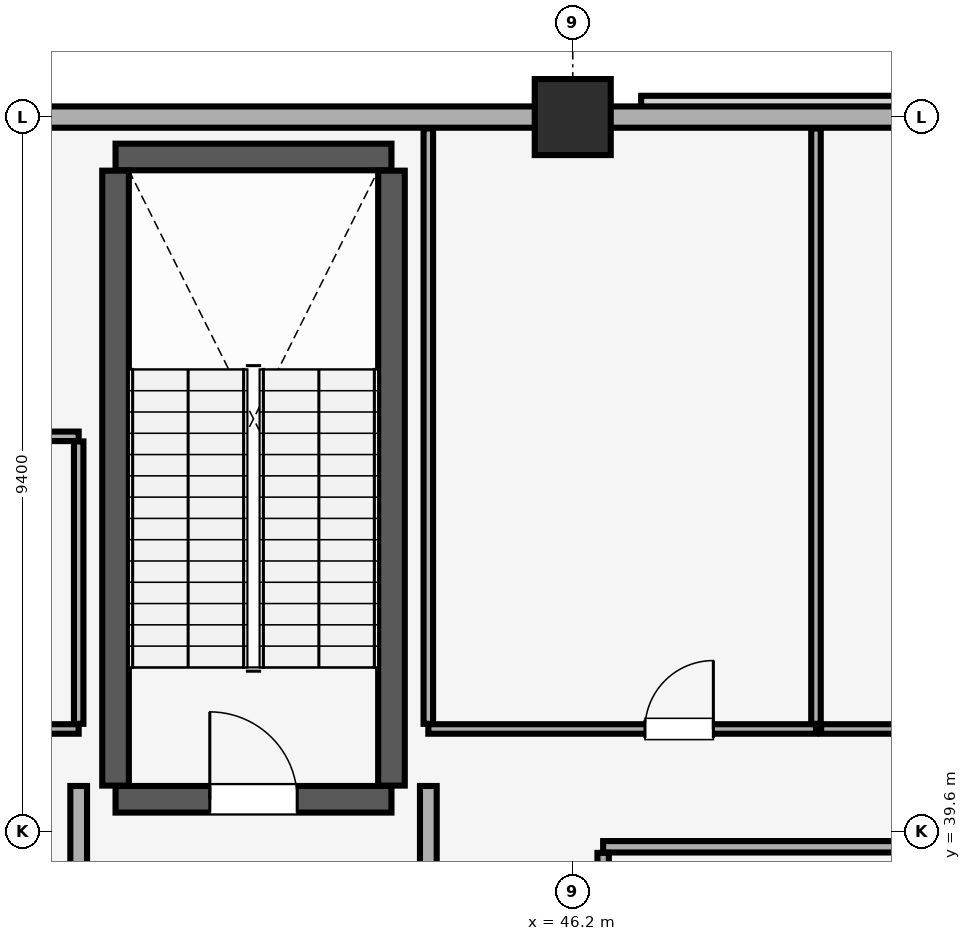
"""IFC4 building model, lengths in metres.
Left out: names, types, materials, properties, quantities, classifications, styles, units other than length and angle.
Written with IfcOpenShell. Run it as: python <this file> out.ifc"""

import sys

from ifc_helpers import new_model, si_unit, direction, frame, frame_2d, origin, origin_2d, place, context, subcontext, project, spatial, rectangle, extrude, element, fill, save


model = new_model("IFC4")
c1 = context("Model", 3, precision=1e-05, world=origin(), true_north=direction((0.0, 1.0)))
c2 = subcontext(c1, "Body", "Model", "MODEL_VIEW")
j1 = project(units=[si_unit("LENGTHUNIT", "METRE"), si_unit("PLANEANGLEUNIT", "RADIAN")], contexts=[c1])
p1 = place(None, origin())
s1 = spatial("IfcSite", under=j1, at=p1, CompositionType="ELEMENT")
p2 = place(p1, origin())
s2 = spatial("IfcBuilding", under=s1, at=p2, CompositionType="ELEMENT")
p3 = place(p2, frame((0.0, 0.0, 280.5)))
s3 = spatial("IfcBuildingStorey", under=s2, at=p3, CompositionType="ELEMENT", Elevation=280.5)
p4 = place(p3, frame((46.2, 49.0, 0.0), z_axis=(0.0, 0.0, 1.0), x_axis=(1.0, 0.0, 0.0)))
e1 = element("IfcColumn", 1, at=p4, inside=s3, PredefinedType="COLUMN", context=c2, shape_type="SweptSolid", body=[
    extrude(rectangle(XDim=1.0, YDim=1.0, at=origin_2d()), origin(), (0.0, 0.0, 1.0), 5.1),
])
p5 = place(p3, frame((74.2, 49.0, 0.0), z_axis=(0.0, 0.0, 1.0), x_axis=(-1.0, 0.0, 0.0)))
e2 = element("IfcWall", 2, at=p5, inside=s3, PredefinedType="SOLIDWALL", context=c2, shape_type="SweptSolid", body=[
    extrude(rectangle(XDim=64.4, YDim=0.28, at=frame_2d((32.2, 0.0))), origin(), (0.0, 0.0, 1.0), 4.0),
])
p6 = place(p3, frame((40.185, 40.025, 0.0), z_axis=(0.0, 0.0, 1.0), x_axis=(1.0, 0.0, 0.0)))
e3 = element("IfcWall", 3, at=p6, inside=s3, PredefinedType="SHEAR", context=c2, shape_type="SweptSolid", body=[
    extrude(rectangle(XDim=3.63, YDim=0.35, at=frame_2d((1.815, 0.0))), origin(), (0.0, 0.0, 1.0), 5.1),
])
p7 = place(p6, frame((1.24, 0.0, 0.0)))
e4 = element("IfcOpeningElement", 4, at=p7, cuts=e3, PredefinedType="OPENING", context=c2, shape_type="SweptSolid", body=[
    extrude(rectangle(XDim=1.15, YDim=2.15, at=frame_2d((0.575, 1.075))), frame((0.0, 0.185, 0.0), z_axis=(0.0, -1.0, 0.0), x_axis=(1.0, 0.0, 0.0)), (0.0, 0.0, 1.0), 0.37),
])
p8 = place(p3, frame((40.185, 48.475, 0.0), z_axis=(0.0, 0.0, 1.0), x_axis=(1.0, 0.0, 0.0)))
e5 = element("IfcWall", 5, at=p8, inside=s3, PredefinedType="SHEAR", context=c2, shape_type="SweptSolid", body=[
    extrude(rectangle(XDim=3.63, YDim=0.35, at=frame_2d((1.815, 0.0))), origin(), (0.0, 0.0, 1.0), 5.1),
])
for number, where, z_axis, x_axis in (
    (6, (40.185, 40.205, 0.0), (0.0, 0.0, 1.0), (0.0, 1.0, 0.0)),
    (7, (43.815, 40.205, 0.0), (0.0, 0.0, 1.0), (0.0, 1.0, 0.0)),
):
    element("IfcWall", number, at=place(p3, frame(where, z_axis=z_axis, x_axis=x_axis)), inside=s3, PredefinedType="SHEAR", context=c2, shape_type="SweptSolid", body=[
        extrude(rectangle(XDim=8.09, YDim=0.35, at=frame_2d((4.045, 0.0))), origin(), (0.0, 0.0, 1.0), 5.1),
    ])
for number, where, z_axis, x_axis in (
    (8, (39.7, 34.415, 0.0), (0.0, 0.0, 1.0), (0.0, 1.0, 0.0)),
    (9, (44.3, 34.415, 0.0), (0.0, 0.0, 1.0), (0.0, 1.0, 0.0)),
):
    element("IfcWall", number, at=place(p3, frame(where, z_axis=z_axis, x_axis=x_axis)), inside=s3, PredefinedType="PARTITIONING", context=c2, shape_type="SweptSolid", body=[
        extrude(rectangle(XDim=5.785, YDim=0.22, at=frame_2d((2.893, 0.0))), origin(), (0.0, 0.0, 1.0), 5.1),
    ])
p9 = place(p3, frame((46.6, 39.4, 0.0), z_axis=(0.0, 0.0, 1.0), x_axis=(1.0, 0.0, 0.0)))
e10 = element("IfcWall", 10, at=p9, inside=s3, PredefinedType="PARTITIONING", context=c2, shape_type="SweptSolid", body=[
    extrude(rectangle(XDim=7.95, YDim=0.15, at=frame_2d((3.975, 0.0))), origin(), (0.0, 0.0, 1.0), 5.1),
])
p10 = place(p3, frame((46.6, 34.38, 0.0), z_axis=(0.0, 0.0, 1.0), x_axis=(0.0, 1.0, 0.0)))
e11 = element("IfcWall", 11, at=p10, inside=s3, PredefinedType="PARTITIONING", context=c2, shape_type="SweptSolid", body=[
    extrude(rectangle(XDim=4.94, YDim=0.15, at=frame_2d((2.47, 0.0))), origin(), (0.0, 0.0, 1.0), 5.1),
])
p11 = place(p3, frame((36.11, 40.95, 0.0), z_axis=(0.0, 0.0, 1.0), x_axis=(1.0, 0.0, 0.0)))
e12 = element("IfcWall", 12, at=p11, inside=s3, PredefinedType="PARTITIONING", context=c2, shape_type="SweptSolid", body=[
    extrude(rectangle(XDim=3.59, YDim=0.125, at=frame_2d((1.795, 0.0))), origin(), (0.0, 0.0, 1.0), 5.1),
])
p12 = place(p11, frame((1.34, 0.0, 0.0)))
e13 = element("IfcOpeningElement", 13, at=p12, cuts=e12, PredefinedType="OPENING", context=c2, shape_type="SweptSolid", body=[
    extrude(rectangle(XDim=0.9, YDim=2.1, at=frame_2d((0.45, 1.05))), frame((0.0, 0.073, 0.0), z_axis=(0.0, -1.0, 0.0), x_axis=(1.0, 0.0, 0.0)), (0.0, 0.0, 1.0), 0.145),
])
p13 = place(p3, frame((36.18, 44.8, 0.0), z_axis=(0.0, 0.0, 1.0), x_axis=(1.0, 0.0, 0.0)))
e14 = element("IfcWall", 14, at=p13, inside=s3, PredefinedType="PARTITIONING", context=c2, shape_type="SweptSolid", body=[
    extrude(rectangle(XDim=3.52, YDim=0.125, at=frame_2d((1.76, 0.0))), origin(), (0.0, 0.0, 1.0), 5.1),
])
p14 = place(p3, frame((39.7, 41.018, 0.0), z_axis=(0.0, 0.0, 1.0), x_axis=(0.0, 1.0, 0.0)))
e15 = element("IfcWall", 15, at=p14, inside=s3, PredefinedType="PARTITIONING", context=c2, shape_type="SweptSolid", body=[
    extrude(rectangle(XDim=3.715, YDim=0.125, at=frame_2d((1.857, 0.0))), origin(), (0.0, 0.0, 1.0), 5.1),
])
p15 = place(p3, frame((44.3, 40.95, 0.0), z_axis=(0.0, 0.0, 1.0), x_axis=(1.0, 0.0, 0.0)))
e16 = element("IfcWall", 16, at=p15, inside=s3, PredefinedType="PARTITIONING", context=c2, shape_type="SweptSolid", body=[
    extrude(rectangle(XDim=5.1, YDim=0.125, at=frame_2d((2.55, 0.0))), origin(), (0.0, 0.0, 1.0), 5.1),
])
p16 = place(p15, frame((2.85, 0.0, 0.0)))
e17 = element("IfcOpeningElement", 17, at=p16, cuts=e16, PredefinedType="OPENING", context=c2, shape_type="SweptSolid", body=[
    extrude(rectangle(XDim=0.9, YDim=2.1, at=frame_2d((0.45, 1.05))), frame((0.0, 0.073, 0.0), z_axis=(0.0, -1.0, 0.0), x_axis=(1.0, 0.0, 0.0)), (0.0, 0.0, 1.0), 0.145),
])
for number, where, z_axis, x_axis in (
    (18, (44.3, 41.018, 0.0), (0.0, 0.0, 1.0), (0.0, 1.0, 0.0)),
    (19, (49.4, 41.018, 0.0), (0.0, 0.0, 1.0), (0.0, 1.0, 0.0)),
):
    element("IfcWall", number, at=place(p3, frame(where, z_axis=z_axis, x_axis=x_axis)), inside=s3, PredefinedType="PARTITIONING", context=c2, shape_type="SweptSolid", body=[
        extrude(rectangle(XDim=7.833, YDim=0.125, at=frame_2d((3.916, 0.0))), origin(), (0.0, 0.0, 1.0), 5.1),
    ])
p17 = place(p3, frame((49.468, 40.95, 0.0), z_axis=(0.0, 0.0, 1.0), x_axis=(1.0, 0.0, 0.0)))
e20 = element("IfcWall", 20, at=p17, inside=s3, PredefinedType="PARTITIONING", context=c2, shape_type="SweptSolid", body=[
    extrude(rectangle(XDim=8.032, YDim=0.125, at=frame_2d((4.016, 0.0))), origin(), (0.0, 0.0, 1.0), 5.1),
])
p18 = place(p17, frame((4.782, 0.0, 0.0)))
e21 = element("IfcOpeningElement", 21, at=p18, cuts=e20, PredefinedType="OPENING", context=c2, shape_type="SweptSolid", body=[
    extrude(rectangle(XDim=0.9, YDim=2.1, at=frame_2d((0.45, 1.05))), frame((0.0, 0.073, 0.0), z_axis=(0.0, -1.0, 0.0), x_axis=(1.0, 0.0, 0.0)), (0.0, 0.0, 1.0), 0.145),
])
p19 = place(p7, origin())
e22 = element("IfcDoor", 22, at=p19, inside=s3, OperationType="SINGLE_SWING_LEFT", PredefinedType="DOOR", context=c2, shape_type="SweptSolid", body=[
    extrude(rectangle(XDim=1.15, YDim=2.15, at=frame_2d((0.575, 1.075))), frame((0.0, 0.025, 0.0), z_axis=(0.0, -1.0, 0.0), x_axis=(1.0, 0.0, 0.0)), (0.0, 0.0, 1.0), 0.05),
])
fill(e4, e22)
p20 = place(p16, origin())
e23 = element("IfcDoor", 23, at=p20, inside=s3, OperationType="SINGLE_SWING_RIGHT", PredefinedType="DOOR", context=c2, shape_type="SweptSolid", body=[
    extrude(rectangle(XDim=0.9, YDim=2.1, at=frame_2d((0.45, 1.05))), frame((0.0, 0.025, 0.0), z_axis=(0.0, -1.0, 0.0), x_axis=(1.0, 0.0, 0.0)), (0.0, 0.0, 1.0), 0.05),
])
fill(e17, e23)
save(model, sys.argv[1])
